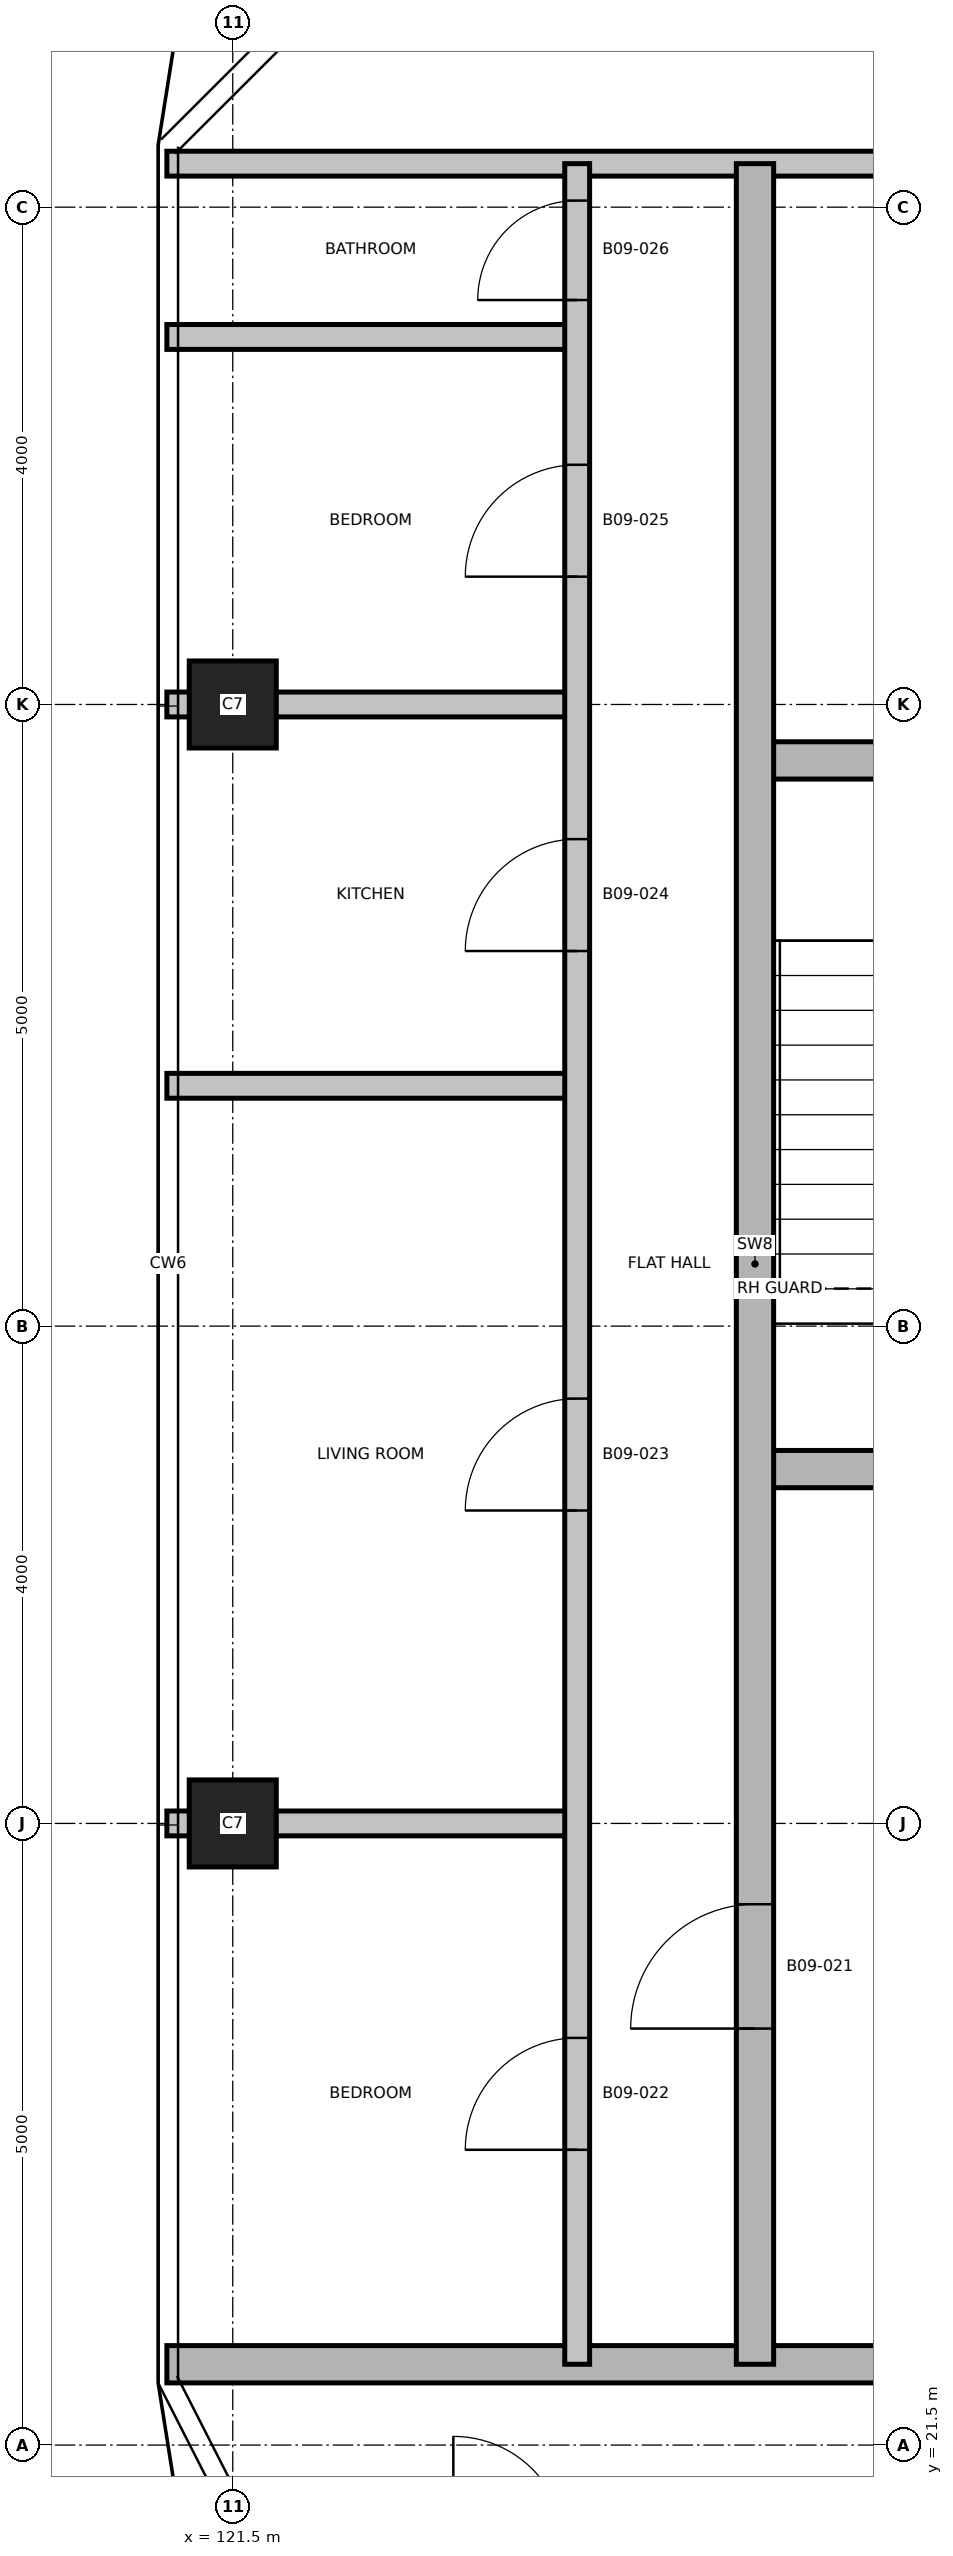
"""IFC4 building model, lengths in metres.
Left out: names, types, materials, properties, quantities, classifications, styles, units other than length and angle.
Written with IfcOpenShell. Run it as: python <this file> out.ifc"""

import sys

from ifc_helpers import new_model, si_unit, direction, frame, frame_2d, origin, origin_2d, place, context, subcontext, project, spatial, rectangle, extrude, element, fill, save


model = new_model("IFC4")
c1 = context("Model", 3, precision=1e-05, world=origin(), true_north=direction((0.0, 1.0)))
c2 = subcontext(c1, "Body", "Model", "MODEL_VIEW")
j1 = project(units=[si_unit("LENGTHUNIT", "METRE"), si_unit("PLANEANGLEUNIT", "RADIAN")], contexts=[c1])
p1 = place(None, origin())
s1 = spatial("IfcSite", under=j1, at=p1, CompositionType="ELEMENT")
p2 = place(p1, origin())
s2 = spatial("IfcBuilding", under=s1, at=p2, CompositionType="ELEMENT")
p3 = place(p2, frame((0.0, 0.0, 98.2)))
s3 = spatial("IfcBuildingStorey", under=s2, at=p3, CompositionType="ELEMENT", Elevation=98.2)
for number, where, z_axis, x_axis in (
    (1, (121.5, 26.5, 0.0), (0.0, 0.0, 1.0), (1.0, 0.0, 0.0)),
    (2, (121.5, 35.5, 0.0), (0.0, 0.0, 1.0), (1.0, 0.0, 0.0)),
):
    element("IfcColumn", number, at=place(p3, frame(where, z_axis=z_axis, x_axis=x_axis)), inside=s3, PredefinedType="COLUMN", context=c2, shape_type="SweptSolid", body=[
        extrude(rectangle(XDim=0.7, YDim=0.7, at=origin_2d()), origin(), (0.0, 0.0, 1.0), 3.7),
    ])
p4 = place(p3, frame((120.97, 22.15, 0.0), z_axis=(0.0, 0.0, 1.0), x_axis=(1.0, 0.0, 0.0)))
e3 = element("IfcWall", 3, at=p4, inside=s3, PredefinedType="SHEAR", context=c2, shape_type="SweptSolid", body=[
    extrude(rectangle(XDim=23.56, YDim=0.3, at=frame_2d((11.78, 0.0))), origin(), (0.0, 0.0, 1.0), 3.4),
])
p5 = place(p4, frame((21.78, 0.0, 0.0)))
e4 = element("IfcOpeningElement", 4, at=p5, cuts=e3, PredefinedType="OPENING", context=c2, shape_type="SweptSolid", body=[
    extrude(rectangle(XDim=1.0, YDim=2.1, at=frame_2d((0.5, 1.05))), frame((0.0, 0.16, 0.0), z_axis=(0.0, -1.0, 0.0), x_axis=(1.0, 0.0, 0.0)), (0.0, 0.0, 1.0), 0.32),
])
p6 = place(p4, frame((10.13, 0.0, 0.0)))
e5 = element("IfcOpeningElement", 5, at=p6, cuts=e3, PredefinedType="OPENING", context=c2, shape_type="SweptSolid", body=[
    extrude(rectangle(XDim=1.0, YDim=2.1, at=frame_2d((0.5, 1.05))), frame((0.0, 0.16, 0.0), z_axis=(0.0, -1.0, 0.0), x_axis=(1.0, 0.0, 0.0)), (0.0, 0.0, 1.0), 0.32),
])
p7 = place(p4, frame((15.78, 0.0, 0.0)))
e6 = element("IfcOpeningElement", 6, at=p7, cuts=e3, PredefinedType="OPENING", context=c2, shape_type="SweptSolid", body=[
    extrude(rectangle(XDim=0.9, YDim=2.1, at=frame_2d((0.45, 1.05))), frame((0.0, 0.16, 0.0), z_axis=(0.0, -1.0, 0.0), x_axis=(1.0, 0.0, 0.0)), (0.0, 0.0, 1.0), 0.32),
])
p8 = place(p3, frame((120.97, 26.5, 0.0), z_axis=(0.0, 0.0, 1.0), x_axis=(1.0, 0.0, 0.0)))
e7 = element("IfcWall", 7, at=p8, inside=s3, PredefinedType="PARTITIONING", context=c2, shape_type="SweptSolid", body=[
    extrude(rectangle(XDim=3.3, YDim=0.2, at=frame_2d((1.65, 0.0))), origin(), (0.0, 0.0, 1.0), 3.4),
])
p9 = place(p3, frame((125.7, 29.35, 0.0), z_axis=(0.0, 0.0, 1.0), x_axis=(1.0, 0.0, 0.0)))
e8 = element("IfcWall", 8, at=p9, inside=s3, PredefinedType="SHEAR", context=c2, shape_type="SweptSolid", body=[
    extrude(rectangle(XDim=2.83, YDim=0.3, at=frame_2d((1.415, 0.0))), origin(), (0.0, 0.0, 1.0), 3.4),
])
p10 = place(p9, frame((0.975, 0.0, 0.0)))
e9 = element("IfcOpeningElement", 9, at=p10, cuts=e8, PredefinedType="OPENING", context=c2, shape_type="SweptSolid", body=[
    extrude(rectangle(XDim=1.2, YDim=2.1, at=frame_2d((0.6, 1.05))), frame((0.0, 0.16, 0.0), z_axis=(0.0, -1.0, 0.0), x_axis=(1.0, 0.0, 0.0)), (0.0, 0.0, 1.0), 0.32),
])
p11 = place(p3, frame((120.97, 32.433, 0.0), z_axis=(0.0, 0.0, 1.0), x_axis=(1.0, 0.0, 0.0)))
e10 = element("IfcWall", 10, at=p11, inside=s3, PredefinedType="PARTITIONING", context=c2, shape_type="SweptSolid", body=[
    extrude(rectangle(XDim=3.3, YDim=0.2, at=frame_2d((1.65, 0.0))), origin(), (0.0, 0.0, 1.0), 3.4),
])
p12 = place(p3, frame((125.7, 35.05, 0.0), z_axis=(0.0, 0.0, 1.0), x_axis=(1.0, 0.0, 0.0)))
e11 = element("IfcWall", 11, at=p12, inside=s3, PredefinedType="SHEAR", context=c2, shape_type="SweptSolid", body=[
    extrude(rectangle(XDim=2.83, YDim=0.3, at=frame_2d((1.415, 0.0))), origin(), (0.0, 0.0, 1.0), 3.4),
])
for number, where, z_axis, x_axis in (
    (12, (120.97, 35.5, 0.0), (0.0, 0.0, 1.0), (1.0, 0.0, 0.0)),
    (13, (120.97, 38.456, 0.0), (0.0, 0.0, 1.0), (1.0, 0.0, 0.0)),
):
    element("IfcWall", number, at=place(p3, frame(where, z_axis=z_axis, x_axis=x_axis)), inside=s3, PredefinedType="PARTITIONING", context=c2, shape_type="SweptSolid", body=[
        extrude(rectangle(XDim=3.3, YDim=0.2, at=frame_2d((1.65, 0.0))), origin(), (0.0, 0.0, 1.0), 3.4),
    ])
p13 = place(p3, frame((120.97, 39.85, 0.0), z_axis=(0.0, 0.0, 1.0), x_axis=(1.0, 0.0, 0.0)))
e14 = element("IfcWall", 14, at=p13, inside=s3, PredefinedType="PARTITIONING", context=c2, shape_type="SweptSolid", body=[
    extrude(rectangle(XDim=23.56, YDim=0.2, at=frame_2d((11.78, 0.0))), origin(), (0.0, 0.0, 1.0), 3.4),
])
p14 = place(p13, frame((10.13, 0.0, 0.0)))
e15 = element("IfcOpeningElement", 15, at=p14, cuts=e14, PredefinedType="OPENING", context=c2, shape_type="SweptSolid", body=[
    extrude(rectangle(XDim=1.0, YDim=2.1, at=frame_2d((0.5, 1.05))), frame((0.0, 0.11, 0.0), z_axis=(0.0, -1.0, 0.0), x_axis=(1.0, 0.0, 0.0)), (0.0, 0.0, 1.0), 0.22),
])
p15 = place(p13, frame((18.78, 0.0, 0.0)))
e16 = element("IfcOpeningElement", 16, at=p15, cuts=e14, PredefinedType="OPENING", context=c2, shape_type="SweptSolid", body=[
    extrude(rectangle(XDim=1.0, YDim=2.1, at=frame_2d((0.5, 1.05))), frame((0.0, 0.11, 0.0), z_axis=(0.0, -1.0, 0.0), x_axis=(1.0, 0.0, 0.0)), (0.0, 0.0, 1.0), 0.22),
])
p16 = place(p3, frame((124.27, 22.15, 0.0), z_axis=(0.0, 0.0, 1.0), x_axis=(0.0, 1.0, 0.0)))
e17 = element("IfcWall", 17, at=p16, inside=s3, PredefinedType="PARTITIONING", context=c2, shape_type="SweptSolid", body=[
    extrude(rectangle(XDim=17.7, YDim=0.2, at=frame_2d((8.85, 0.0))), origin(), (0.0, 0.0, 1.0), 3.4),
])
p17 = place(p16, frame((1.725, 0.0, 0.0)))
e18 = element("IfcOpeningElement", 18, at=p17, cuts=e17, PredefinedType="OPENING", context=c2, shape_type="SweptSolid", body=[
    extrude(rectangle(XDim=0.9, YDim=2.1, at=frame_2d((0.45, 1.05))), frame((0.0, 0.11, 0.0), z_axis=(0.0, -1.0, 0.0), x_axis=(1.0, 0.0, 0.0)), (0.0, 0.0, 1.0), 0.22),
])
p18 = place(p16, frame((6.867, 0.0, 0.0)))
e19 = element("IfcOpeningElement", 19, at=p18, cuts=e17, PredefinedType="OPENING", context=c2, shape_type="SweptSolid", body=[
    extrude(rectangle(XDim=0.9, YDim=2.1, at=frame_2d((0.45, 1.05))), frame((0.0, 0.11, 0.0), z_axis=(0.0, -1.0, 0.0), x_axis=(1.0, 0.0, 0.0)), (0.0, 0.0, 1.0), 0.22),
])
p19 = place(p16, frame((11.367, 0.0, 0.0)))
e20 = element("IfcOpeningElement", 20, at=p19, cuts=e17, PredefinedType="OPENING", context=c2, shape_type="SweptSolid", body=[
    extrude(rectangle(XDim=0.9, YDim=2.1, at=frame_2d((0.45, 1.05))), frame((0.0, 0.11, 0.0), z_axis=(0.0, -1.0, 0.0), x_axis=(1.0, 0.0, 0.0)), (0.0, 0.0, 1.0), 0.22),
])
p20 = place(p16, frame((14.378, 0.0, 0.0)))
e21 = element("IfcOpeningElement", 21, at=p20, cuts=e17, PredefinedType="OPENING", context=c2, shape_type="SweptSolid", body=[
    extrude(rectangle(XDim=0.9, YDim=2.1, at=frame_2d((0.45, 1.05))), frame((0.0, 0.11, 0.0), z_axis=(0.0, -1.0, 0.0), x_axis=(1.0, 0.0, 0.0)), (0.0, 0.0, 1.0), 0.22),
])
p21 = place(p16, frame((16.603, 0.0, 0.0)))
e22 = element("IfcOpeningElement", 22, at=p21, cuts=e17, PredefinedType="OPENING", context=c2, shape_type="SweptSolid", body=[
    extrude(rectangle(XDim=0.8, YDim=2.1, at=frame_2d((0.4, 1.05))), frame((0.0, 0.11, 0.0), z_axis=(0.0, -1.0, 0.0), x_axis=(1.0, 0.0, 0.0)), (0.0, 0.0, 1.0), 0.22),
])
p22 = place(p3, frame((125.7, 22.15, 0.0), z_axis=(0.0, 0.0, 1.0), x_axis=(0.0, 1.0, 0.0)))
e23 = element("IfcWall", 23, at=p22, inside=s3, PredefinedType="SHEAR", context=c2, shape_type="SweptSolid", body=[
    extrude(rectangle(XDim=17.7, YDim=0.3, at=frame_2d((8.85, 0.0))), origin(), (0.0, 0.0, 1.0), 3.4),
])
p23 = place(p22, frame((2.7, 0.0, 0.0)))
e24 = element("IfcOpeningElement", 24, at=p23, cuts=e23, PredefinedType="OPENING", context=c2, shape_type="SweptSolid", body=[
    extrude(rectangle(XDim=1.0, YDim=2.1, at=frame_2d((0.5, 1.05))), frame((0.0, 0.16, 0.0), z_axis=(0.0, -1.0, 0.0), x_axis=(1.0, 0.0, 0.0)), (0.0, 0.0, 1.0), 0.32),
])
p24 = place(p23, origin())
e25 = element("IfcDoor", 25, at=p24, inside=s3, OperationType="SINGLE_SWING_LEFT", PredefinedType="DOOR", context=c2, shape_type="SweptSolid", body=[
    extrude(rectangle(XDim=1.0, YDim=2.1, at=frame_2d((0.5, 1.05))), frame((0.0, 0.025, 0.0), z_axis=(0.0, -1.0, 0.0), x_axis=(1.0, 0.0, 0.0)), (0.0, 0.0, 1.0), 0.05),
])
fill(e24, e25)
p25 = place(p17, origin())
e26 = element("IfcDoor", 26, at=p25, inside=s3, OperationType="SINGLE_SWING_RIGHT", PredefinedType="DOOR", context=c2, shape_type="SweptSolid", body=[
    extrude(rectangle(XDim=0.9, YDim=2.1, at=frame_2d((0.45, 1.05))), frame((0.0, 0.025, 0.0), z_axis=(0.0, -1.0, 0.0), x_axis=(1.0, 0.0, 0.0)), (0.0, 0.0, 1.0), 0.05),
])
fill(e18, e26)
p26 = place(p18, origin())
e27 = element("IfcDoor", 27, at=p26, inside=s3, OperationType="SINGLE_SWING_LEFT", PredefinedType="DOOR", context=c2, shape_type="SweptSolid", body=[
    extrude(rectangle(XDim=0.9, YDim=2.1, at=frame_2d((0.45, 1.05))), frame((0.0, 0.025, 0.0), z_axis=(0.0, -1.0, 0.0), x_axis=(1.0, 0.0, 0.0)), (0.0, 0.0, 1.0), 0.05),
])
fill(e19, e27)
p27 = place(p19, origin())
e28 = element("IfcDoor", 28, at=p27, inside=s3, OperationType="SINGLE_SWING_RIGHT", PredefinedType="DOOR", context=c2, shape_type="SweptSolid", body=[
    extrude(rectangle(XDim=0.9, YDim=2.1, at=frame_2d((0.45, 1.05))), frame((0.0, 0.025, 0.0), z_axis=(0.0, -1.0, 0.0), x_axis=(1.0, 0.0, 0.0)), (0.0, 0.0, 1.0), 0.05),
])
fill(e20, e28)
p28 = place(p20, origin())
e29 = element("IfcDoor", 29, at=p28, inside=s3, OperationType="SINGLE_SWING_LEFT", PredefinedType="DOOR", context=c2, shape_type="SweptSolid", body=[
    extrude(rectangle(XDim=0.9, YDim=2.1, at=frame_2d((0.45, 1.05))), frame((0.0, 0.025, 0.0), z_axis=(0.0, -1.0, 0.0), x_axis=(1.0, 0.0, 0.0)), (0.0, 0.0, 1.0), 0.05),
])
fill(e21, e29)
p29 = place(p21, origin())
e30 = element("IfcDoor", 30, at=p29, inside=s3, OperationType="SINGLE_SWING_RIGHT", PredefinedType="DOOR", context=c2, shape_type="SweptSolid", body=[
    extrude(rectangle(XDim=0.8, YDim=2.1, at=frame_2d((0.4, 1.05))), frame((0.0, 0.025, 0.0), z_axis=(0.0, -1.0, 0.0), x_axis=(1.0, 0.0, 0.0)), (0.0, 0.0, 1.0), 0.05),
])
fill(e22, e30)
save(model, sys.argv[1])
